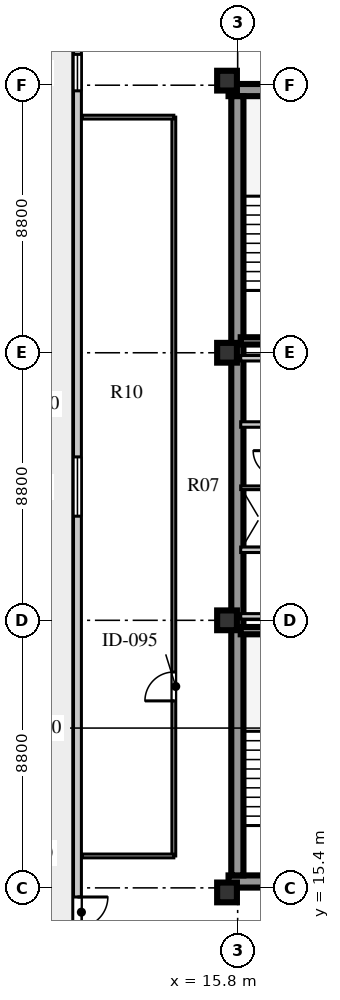
"""IFC4 building model, lengths in metres.
Left out: names, types, materials, properties, quantities, classifications, styles, units other than length and angle.
Written with IfcOpenShell. Run it as: python <this file> out.ifc"""

import sys

from ifc_helpers import new_model, si_unit, direction, frame, frame_2d, origin, origin_2d, place, context, subcontext, project, spatial, rectangle, extrude, element, fill, save


model = new_model("IFC4")
c1 = context("Model", 3, precision=1e-05, world=origin(), true_north=direction((0.0, 1.0)))
c2 = subcontext(c1, "Body", "Model", "MODEL_VIEW")
j1 = project(units=[si_unit("LENGTHUNIT", "METRE"), si_unit("PLANEANGLEUNIT", "RADIAN")], contexts=[c1])
p1 = place(None, origin())
s1 = spatial("IfcSite", under=j1, at=p1, CompositionType="ELEMENT")
p2 = place(p1, origin())
s2 = spatial("IfcBuilding", under=s1, at=p2, CompositionType="ELEMENT")
p3 = place(p2, frame((0.0, 0.0, 272.6)))
s3 = spatial("IfcBuildingStorey", under=s2, at=p3, CompositionType="ELEMENT", Elevation=272.6)
for number, where, z_axis, x_axis in (
    (1, (15.5, 15.61, 0.0), (0.0, 0.0, 1.0), (1.0, 0.0, 0.0)),
    (2, (15.5, 41.64, 0.0), (0.0, 0.0, 1.0), (1.0, 0.0, 0.0)),
):
    element("IfcWall", number, at=place(p3, frame(where, z_axis=z_axis, x_axis=x_axis)), inside=s3, PredefinedType="SHEAR", context=c2, shape_type="SweptSolid", body=[
        extrude(rectangle(XDim=9.48, YDim=0.4, at=frame_2d((4.74, 0.0))), origin(), (0.0, 0.0, 1.0), 3.66),
    ])
p4 = place(p3, frame((15.79, 15.81, 0.0), z_axis=(0.0, 0.0, 1.0), x_axis=(0.0, 1.0, 0.0)))
e3 = element("IfcWall", 3, at=p4, inside=s3, PredefinedType="SHEAR", context=c2, shape_type="SweptSolid", body=[
    extrude(rectangle(XDim=25.63, YDim=0.4, at=frame_2d((12.815, 0.0))), origin(), (0.0, 0.0, 1.0), 3.66),
])
for number, where, z_axis, x_axis in (
    (4, (15.45, 15.25, 0.0), (0.0, 0.0, 1.0), (1.0, 0.0, 0.0)),
    (5, (15.45, 24.2, 0.0), (0.0, 0.0, 1.0), (1.0, 0.0, 0.0)),
    (6, (15.45, 33.0, 0.0), (0.0, 0.0, 1.0), (1.0, 0.0, 0.0)),
    (7, (15.45, 41.95, 0.0), (0.0, 0.0, 1.0), (1.0, 0.0, 0.0)),
):
    element("IfcColumn", number, at=place(p3, frame(where, z_axis=z_axis, x_axis=x_axis)), inside=s3, PredefinedType="COLUMN", context=c2, shape_type="SweptSolid", body=[
        extrude(rectangle(XDim=0.65, YDim=0.65, at=origin_2d()), origin(), (0.0, 0.0, 1.0), 3.66),
    ])
p5 = place(p3, frame((10.53, 43.79, 0.0), z_axis=(0.0, 0.0, 1.0), x_axis=(0.0, -1.0, 0.0)))
e8 = element("IfcWall", 8, at=p5, inside=s3, PredefinedType="SOLIDWALL", context=c2, shape_type="SweptSolid", body=[
    extrude(rectangle(XDim=30.38, YDim=0.26, at=frame_2d((15.19, 0.0))), origin(), (0.0, 0.0, 1.0), 3.66),
])
p6 = place(p5, frame((28.69, 0.0, 0.0)))
e9 = element("IfcOpeningElement", 9, at=p6, cuts=e8, PredefinedType="OPENING", context=c2, shape_type="SweptSolid", body=[
    extrude(rectangle(XDim=1.0, YDim=2.05, at=frame_2d((0.5, 1.025))), frame((0.0, 0.14, 0.0), z_axis=(0.0, -1.0, 0.0), x_axis=(1.0, 0.0, 0.0)), (0.0, 0.0, 1.0), 0.28),
])
p7 = place(p5, frame((14.215, 0.0, 0.8)))
e10 = element("IfcOpeningElement", 10, at=p7, cuts=e8, PredefinedType="OPENING", context=c2, shape_type="SweptSolid", body=[
    extrude(rectangle(XDim=1.95, YDim=2.0, at=frame_2d((0.975, 1.0))), frame((0.0, 0.14, 0.0), z_axis=(0.0, -1.0, 0.0), x_axis=(1.0, 0.0, 0.0)), (0.0, 0.0, 1.0), 0.28),
])
p8 = place(p5, frame((0.975, 0.0, 0.8)))
e11 = element("IfcOpeningElement", 11, at=p8, cuts=e8, PredefinedType="OPENING", context=c2, shape_type="SweptSolid", body=[
    extrude(rectangle(XDim=1.2, YDim=1.75, at=frame_2d((0.6, 0.875))), frame((0.0, 0.14, 0.0), z_axis=(0.0, -1.0, 0.0), x_axis=(1.0, 0.0, 0.0)), (0.0, 0.0, 1.0), 0.28),
])
p9 = place(p3, frame((15.9, 23.86, 0.0), z_axis=(0.0, 0.0, 1.0), x_axis=(1.0, 0.0, 0.0)))
e12 = element("IfcWall", 12, at=p9, inside=s3, PredefinedType="SHEAR", context=c2, shape_type="SweptSolid", body=[
    extrude(rectangle(XDim=3.52, YDim=0.24, at=frame_2d((1.76, 0.0))), origin(), (0.0, 0.0, 1.0), 3.9),
])
p10 = place(p3, frame((15.9, 26.52, 0.0), z_axis=(0.0, 0.0, 1.0), x_axis=(1.0, 0.0, 0.0)))
e13 = element("IfcWall", 13, at=p10, inside=s3, PredefinedType="SOLIDWALL", context=c2, shape_type="SweptSolid", body=[
    extrude(rectangle(XDim=8.68, YDim=0.18, at=frame_2d((4.34, 0.0))), origin(), (0.0, 0.0, 1.0), 3.66),
])
p11 = place(p10, frame((2.5, 0.0, 0.0)))
e14 = element("IfcOpeningElement", 14, at=p11, cuts=e13, PredefinedType="OPENING", context=c2, shape_type="SweptSolid", body=[
    extrude(rectangle(XDim=0.95, YDim=2.1, at=frame_2d((0.475, 1.05))), frame((0.0, 0.1, 0.0), z_axis=(0.0, -1.0, 0.0), x_axis=(1.0, 0.0, 0.0)), (0.0, 0.0, 1.0), 0.2),
])
p12 = place(p10, frame((6.0, 0.0, 0.0)))
e15 = element("IfcOpeningElement", 15, at=p12, cuts=e13, PredefinedType="OPENING", context=c2, shape_type="SweptSolid", body=[
    extrude(rectangle(XDim=0.95, YDim=2.1, at=frame_2d((0.475, 1.05))), frame((0.0, 0.1, 0.0), z_axis=(0.0, -1.0, 0.0), x_axis=(1.0, 0.0, 0.0)), (0.0, 0.0, 1.0), 0.2),
])
p13 = place(p3, frame((15.9, 24.33, 0.0), z_axis=(0.0, 0.0, 1.0), x_axis=(1.0, 0.0, 0.0)))
e16 = element("IfcWall", 16, at=p13, inside=s3, PredefinedType="SOLIDWALL", context=c2, shape_type="SweptSolid", body=[
    extrude(rectangle(XDim=8.68, YDim=0.18, at=frame_2d((4.34, 0.0))), origin(), (0.0, 0.0, 1.0), 3.06),
])
p14 = place(p3, frame((15.9, 28.56, 0.0), z_axis=(0.0, 0.0, 1.0), x_axis=(1.0, 0.0, 0.0)))
e17 = element("IfcWall", 17, at=p14, inside=s3, PredefinedType="PARTITIONING", context=c2, shape_type="SweptSolid", body=[
    extrude(rectangle(XDim=1.2, YDim=0.12, at=frame_2d((0.6, 0.0))), origin(), (0.0, 0.0, 1.0), 3.66),
])
p15 = place(p3, frame((15.9, 30.64, 0.0), z_axis=(0.0, 0.0, 1.0), x_axis=(1.0, 0.0, 0.0)))
e18 = element("IfcWall", 18, at=p15, inside=s3, PredefinedType="SOLIDWALL", context=c2, shape_type="SweptSolid", body=[
    extrude(rectangle(XDim=8.68, YDim=0.18, at=frame_2d((4.34, 0.0))), origin(), (0.0, 0.0, 1.0), 3.66),
])
p16 = place(p15, frame((3.7, 0.0, 0.0)))
e19 = element("IfcOpeningElement", 19, at=p16, cuts=e18, PredefinedType="OPENING", context=c2, shape_type="SweptSolid", body=[
    extrude(rectangle(XDim=0.95, YDim=2.1, at=frame_2d((0.475, 1.05))), frame((0.0, 0.1, 0.0), z_axis=(0.0, -1.0, 0.0), x_axis=(1.0, 0.0, 0.0)), (0.0, 0.0, 1.0), 0.2),
])
p17 = place(p3, frame((15.9, 32.82, 0.0), z_axis=(0.0, 0.0, 1.0), x_axis=(1.0, 0.0, 0.0)))
e20 = element("IfcWall", 20, at=p17, inside=s3, PredefinedType="SOLIDWALL", context=c2, shape_type="SweptSolid", body=[
    extrude(rectangle(XDim=8.68, YDim=0.18, at=frame_2d((4.34, 0.0))), origin(), (0.0, 0.0, 1.0), 3.06),
])
p18 = place(p3, frame((15.9, 33.39, 0.0), z_axis=(0.0, 0.0, 1.0), x_axis=(1.0, 0.0, 0.0)))
e21 = element("IfcWall", 21, at=p18, inside=s3, PredefinedType="SHEAR", context=c2, shape_type="SweptSolid", body=[
    extrude(rectangle(XDim=3.52, YDim=0.24, at=frame_2d((1.76, 0.0))), origin(), (0.0, 0.0, 1.0), 3.9),
])
p19 = place(p3, frame((13.7, 16.45, 0.0), z_axis=(0.0, 0.0, 1.0), x_axis=(0.0, 1.0, 0.0)))
e22 = element("IfcWall", 22, at=p19, inside=s3, PredefinedType="PLUMBINGWALL", context=c2, shape_type="SweptSolid", body=[
    extrude(rectangle(XDim=24.3, YDim=0.125, at=frame_2d((12.15, 0.0))), origin(), (0.0, 0.0, 1.0), 3.66),
])
p20 = place(p19, frame((5.1, 0.0, 0.0)))
e23 = element("IfcOpeningElement", 23, at=p20, cuts=e22, PredefinedType="OPENING", context=c2, shape_type="SweptSolid", body=[
    extrude(rectangle(XDim=0.95, YDim=2.08, at=frame_2d((0.475, 1.04))), frame((0.0, 0.073, 0.0), z_axis=(0.0, -1.0, 0.0), x_axis=(1.0, 0.0, 0.0)), (0.0, 0.0, 1.0), 0.145),
])
for number, where, z_axis, x_axis in (
    (24, (10.68, 16.45, 0.0), (0.0, 0.0, 1.0), (1.0, 0.0, 0.0)),
    (25, (10.68, 40.75, 0.0), (0.0, 0.0, 1.0), (1.0, 0.0, 0.0)),
):
    element("IfcWall", number, at=place(p3, frame(where, z_axis=z_axis, x_axis=x_axis)), inside=s3, PredefinedType="PLUMBINGWALL", context=c2, shape_type="SweptSolid", body=[
        extrude(rectangle(XDim=3.02, YDim=0.125, at=frame_2d((1.51, 0.0))), origin(), (0.0, 0.0, 1.0), 3.66),
    ])
p21 = place(p6, frame((1.0, 0.0, 0.0), z_axis=(0.0, 0.0, 1.0), x_axis=(-1.0, 0.0, 0.0)))
e26 = element("IfcDoor", 26, at=p21, inside=s3, OperationType="SINGLE_SWING_RIGHT", PredefinedType="DOOR", context=c2, shape_type="SweptSolid", body=[
    extrude(rectangle(XDim=1.0, YDim=2.05, at=frame_2d((0.5, 1.025))), frame((0.0, 0.025, 0.0), z_axis=(0.0, -1.0, 0.0), x_axis=(1.0, 0.0, 0.0)), (0.0, 0.0, 1.0), 0.05),
])
fill(e9, e26)
p22 = place(p7, origin())
e27 = element("IfcWindow", 27, at=p22, inside=s3, PartitioningType="SINGLE_PANEL", PredefinedType="WINDOW", context=c2, shape_type="SweptSolid", body=[
    extrude(rectangle(XDim=1.95, YDim=2.0, at=frame_2d((0.975, 1.0))), frame((0.0, 0.03, 0.0), z_axis=(0.0, -1.0, 0.0), x_axis=(1.0, 0.0, 0.0)), (0.0, 0.0, 1.0), 0.06),
])
fill(e10, e27)
p23 = place(p8, origin())
e28 = element("IfcWindow", 28, at=p23, inside=s3, PartitioningType="SINGLE_PANEL", PredefinedType="WINDOW", context=c2, shape_type="SweptSolid", body=[
    extrude(rectangle(XDim=1.2, YDim=1.75, at=frame_2d((0.6, 0.875))), frame((0.0, 0.03, 0.0), z_axis=(0.0, -1.0, 0.0), x_axis=(1.0, 0.0, 0.0)), (0.0, 0.0, 1.0), 0.06),
])
fill(e11, e28)
p24 = place(p20, origin())
e29 = element("IfcDoor", 29, at=p24, inside=s3, OperationType="SINGLE_SWING_LEFT", PredefinedType="DOOR", context=c2, shape_type="SweptSolid", body=[
    extrude(rectangle(XDim=0.95, YDim=2.08, at=frame_2d((0.475, 1.04))), frame((0.0, 0.025, 0.0), z_axis=(0.0, -1.0, 0.0), x_axis=(1.0, 0.0, 0.0)), (0.0, 0.0, 1.0), 0.05),
])
fill(e23, e29)
save(model, sys.argv[1])
